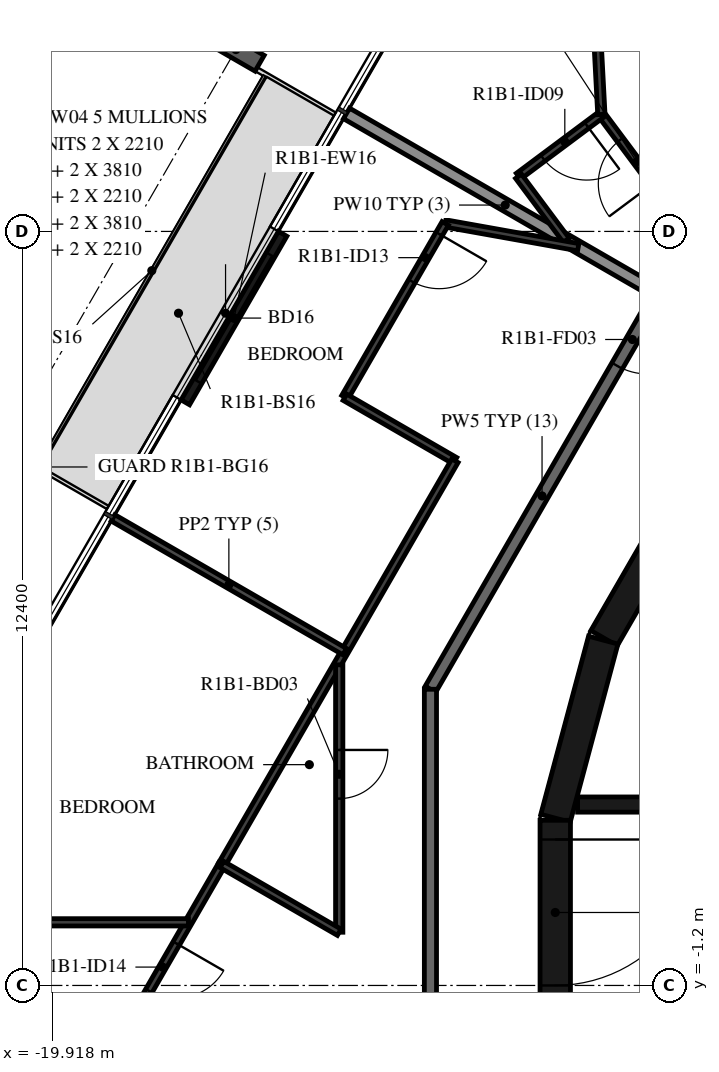
"""IFC4 building model, lengths in metres.
Left out: names, types, materials, properties, quantities, classifications, styles, units other than length and angle.
Written with IfcOpenShell. Run it as: python <this file> out.ifc"""

import sys

from ifc_helpers import new_model, si_unit, direction, frame, frame_2d, origin, origin_2d, place, context, subcontext, project, spatial, rectangle, i_section, extrude, element, fill, save


model = new_model("IFC4")
c1 = context("Model", 3, precision=1e-05, world=origin(), true_north=direction((0.0, 1.0)))
c2 = subcontext(c1, "Body", "Model", "MODEL_VIEW")
j1 = project(units=[si_unit("LENGTHUNIT", "METRE"), si_unit("PLANEANGLEUNIT", "RADIAN")], contexts=[c1])
p1 = place(None, origin())
s1 = spatial("IfcSite", under=j1, at=p1, CompositionType="ELEMENT")
p2 = place(p1, origin())
s2 = spatial("IfcBuilding", under=s1, at=p2, CompositionType="ELEMENT")
p3 = place(p2, frame((0.0, 0.0, 48.9)))
s3 = spatial("IfcBuildingStorey", under=s2, at=p3, CompositionType="ELEMENT", Elevation=48.9)
p4 = place(p3, frame((-16.899, 14.19, -0.38), z_axis=(0.0, 0.0, 1.0), x_axis=(0.50000017485, 0.866025302835, 0.0)))
e1 = element("IfcColumn", 1, at=p4, inside=s3, PredefinedType="COLUMN", context=c2, shape_type="SweptSolid", body=[
    extrude(i_section(OverallWidth=0.3, OverallDepth=0.9, WebThickness=0.019, FlangeThickness=0.035, FilletRadius=0.03, at=origin_2d()), origin(), (0.0, 0.0, 1.0), 3.5),
])
p5 = place(p3, frame((-16.131, 11.161, 0.0), z_axis=(0.0, 0.0, 1.0), x_axis=(-0.500028443584, -0.866008981251, 0.0)))
e2 = element("IfcWall", 2, at=p5, inside=s3, PredefinedType="STANDARD", context=c2, shape_type="SweptSolid", body=[
    extrude(rectangle(XDim=3.2, YDim=0.16, at=frame_2d((1.6, 0.0))), origin(), (0.0, 0.0, 1.0), 3.12),
])
p6 = place(p5, frame((0.4, 0.0, 0.0)))
e3 = element("IfcOpeningElement", 3, at=p6, cuts=e2, PredefinedType="OPENING", context=c2, shape_type="SweptSolid", body=[
    extrude(rectangle(XDim=2.4, YDim=2.4, at=frame_2d((1.2, 1.2))), frame((0.0, 0.09, 0.0), z_axis=(0.0, -1.0, 0.0), x_axis=(1.0, 0.0, 0.0)), (0.0, 0.0, 1.0), 0.18),
])
for number, where, z_axis, x_axis in (
    (4, (-9.329, 7.137, 0.0), (0.0, 0.0, 1.0), (-0.5, -0.866, 0.0)),
    (5, (-10.858, 4.479, 0.0), (0.0, 0.0, 1.0), (-0.259, -0.966, 0.0)),
):
    element("IfcWall", number, at=place(p3, frame(where, z_axis=z_axis, x_axis=x_axis)), inside=s3, PredefinedType="SHEAR", context=c2, shape_type="SweptSolid", body=[
        extrude(rectangle(XDim=3.033, YDim=0.5, at=frame_2d((1.516, 0.0))), origin(), (0.0, 0.0, 1.0), 3.12),
    ])
p7 = place(p3, frame((-11.647, 1.516, 0.0), z_axis=(0.0, 0.0, 1.0), x_axis=(0.0, -1.0, 0.0)))
e6 = element("IfcWall", 6, at=p7, inside=s3, PredefinedType="SHEAR", context=c2, shape_type="SweptSolid", body=[
    extrude(rectangle(XDim=3.033, YDim=0.5, at=frame_2d((1.516, 0.0))), origin(), (0.0, 0.0, 1.0), 3.12),
])
p8 = place(p7, frame((0.316, 0.0, 0.0)))
e7 = element("IfcOpeningElement", 7, at=p8, cuts=e6, PredefinedType="OPENING", context=c2, shape_type="SweptSolid", body=[
    extrude(rectangle(XDim=2.4, YDim=2.1, at=frame_2d((1.2, 1.05))), frame((0.0, 0.26, 0.0), z_axis=(0.0, -1.0, 0.0), x_axis=(1.0, 0.0, 0.0)), (0.0, 0.0, 1.0), 0.52),
])
p9 = place(p3, frame((-11.28, 1.775, 0.0), z_axis=(0.0, 0.0, 1.0), x_axis=(1.0, 0.0, 0.0)))
e8 = element("IfcWall", 8, at=p9, inside=s3, PredefinedType="SHEAR", context=c2, shape_type="SweptSolid", body=[
    extrude(rectangle(XDim=14.38, YDim=0.25, at=frame_2d((7.19, 0.0))), origin(), (0.0, 0.0, 1.0), 3.12),
])
p10 = place(p9, frame((2.13, 0.0, 0.0)))
e9 = element("IfcOpeningElement", 9, at=p10, cuts=e8, PredefinedType="OPENING", context=c2, shape_type="SweptSolid", body=[
    extrude(rectangle(XDim=1.1, YDim=2.1, at=frame_2d((0.55, 1.05))), frame((0.0, 0.135, 0.0), z_axis=(0.0, -1.0, 0.0), x_axis=(1.0, 0.0, 0.0)), (0.0, 0.0, 1.0), 0.27),
])
p11 = place(p9, frame((4.28, 0.0, 0.0)))
e10 = element("IfcOpeningElement", 10, at=p11, cuts=e8, PredefinedType="OPENING", context=c2, shape_type="SweptSolid", body=[
    extrude(rectangle(XDim=1.1, YDim=2.1, at=frame_2d((0.55, 1.05))), frame((0.0, 0.135, 0.0), z_axis=(0.0, -1.0, 0.0), x_axis=(1.0, 0.0, 0.0)), (0.0, 0.0, 1.0), 0.27),
])
p12 = place(p9, frame((6.43, 0.0, 0.0)))
e11 = element("IfcOpeningElement", 11, at=p12, cuts=e8, PredefinedType="OPENING", context=c2, shape_type="SweptSolid", body=[
    extrude(rectangle(XDim=1.1, YDim=2.1, at=frame_2d((0.55, 1.05))), frame((0.0, 0.135, 0.0), z_axis=(0.0, -1.0, 0.0), x_axis=(1.0, 0.0, 0.0)), (0.0, 0.0, 1.0), 0.27),
])
p13 = place(p9, frame((8.58, 0.0, 0.0)))
e12 = element("IfcOpeningElement", 12, at=p13, cuts=e8, PredefinedType="OPENING", context=c2, shape_type="SweptSolid", body=[
    extrude(rectangle(XDim=1.1, YDim=2.1, at=frame_2d((0.55, 1.05))), frame((0.0, 0.135, 0.0), z_axis=(0.0, -1.0, 0.0), x_axis=(1.0, 0.0, 0.0)), (0.0, 0.0, 1.0), 0.27),
])
p14 = place(p9, frame((10.83, 0.0, 0.0)))
e13 = element("IfcOpeningElement", 13, at=p14, cuts=e8, PredefinedType="OPENING", context=c2, shape_type="SweptSolid", body=[
    extrude(rectangle(XDim=0.9, YDim=2.1, at=frame_2d((0.45, 1.05))), frame((0.0, 0.135, 0.0), z_axis=(0.0, -1.0, 0.0), x_axis=(1.0, 0.0, 0.0)), (0.0, 0.0, 1.0), 0.27),
])
p15 = place(p9, frame((12.98, 0.0, 0.0)))
e14 = element("IfcOpeningElement", 14, at=p15, cuts=e8, PredefinedType="OPENING", context=c2, shape_type="SweptSolid", body=[
    extrude(rectangle(XDim=0.9, YDim=2.1, at=frame_2d((0.45, 1.05))), frame((0.0, 0.135, 0.0), z_axis=(0.0, -1.0, 0.0), x_axis=(1.0, 0.0, 0.0)), (0.0, 0.0, 1.0), 0.27),
])
p16 = place(p3, frame((-10.029, 10.029, 0.0), z_axis=(0.0, 0.0, 1.0), x_axis=(-0.500001669485, -0.866024439905, 0.0)))
e15 = element("IfcWall", 15, at=p16, inside=s3, PredefinedType="STANDARD", context=c2, shape_type="SweptSolid", body=[
    extrude(rectangle(XDim=7.342, YDim=0.2, at=frame_2d((3.671, 0.0))), origin(), (0.0, 0.0, 1.0), 3.12),
])
p17 = place(p16, frame((0.2, 0.0, 0.0)))
e16 = element("IfcOpeningElement", 16, at=p17, cuts=e15, PredefinedType="OPENING", context=c2, shape_type="SweptSolid", body=[
    extrude(rectangle(XDim=1.0, YDim=2.1, at=frame_2d((0.5, 1.05))), frame((0.0, 0.11, 0.0), z_axis=(0.0, -1.0, 0.0), x_axis=(1.0, 0.0, 0.0)), (0.0, 0.0, 1.0), 0.22),
])
p18 = place(p3, frame((-13.7, 3.671, 0.0), z_axis=(0.0, 0.0, 1.0), x_axis=(0.0, -1.0, 0.0)))
e17 = element("IfcWall", 17, at=p18, inside=s3, PredefinedType="STANDARD", context=c2, shape_type="SweptSolid", body=[
    extrude(rectangle(XDim=7.342, YDim=0.2, at=frame_2d((3.671, 0.0))), origin(), (0.0, 0.0, 1.0), 3.12),
])
p19 = place(p3, frame((-15.08, 13.14, 0.0), z_axis=(0.0, 0.0, 1.0), x_axis=(0.86603112331, -0.49999009336, 0.0)))
e18 = element("IfcWall", 18, at=p19, inside=s3, PredefinedType="STANDARD", context=c2, shape_type="SweptSolid", body=[
    extrude(rectangle(XDim=6.027, YDim=0.2, at=frame_2d((3.014, 0.0))), origin(), (0.0, 0.0, 1.0), 2.73),
])
p20 = place(p3, frame((-9.92, 11.824, 0.0), z_axis=(0.0, 0.0, 1.0), x_axis=(-0.597853402964, 0.801605456921, 0.0)))
e19 = element("IfcWall", 19, at=p20, inside=s3, PredefinedType="PARTITIONING", context=c2, shape_type="SweptSolid", body=[
    extrude(rectangle(XDim=1.621, YDim=0.12, at=frame_2d((0.811, 0.0))), origin(), (0.0, 0.0, 1.0), 3.12),
])
p21 = place(p20, frame((0.2, 0.0, 0.0)))
e20 = element("IfcOpeningElement", 20, at=p21, cuts=e19, PredefinedType="OPENING", context=c2, shape_type="SweptSolid", body=[
    extrude(rectangle(XDim=0.9, YDim=2.1, at=frame_2d((0.45, 1.05))), frame((0.0, 0.07, 0.0), z_axis=(0.0, -1.0, 0.0), x_axis=(1.0, 0.0, 0.0)), (0.0, 0.0, 1.0), 0.14),
])
p22 = place(p3, frame((-10.889, 13.124, 0.0), z_axis=(0.0, 0.0, 1.0), x_axis=(-0.801616976804, -0.597837956724, 0.0)))
e21 = element("IfcWall", 21, at=p22, inside=s3, PredefinedType="PARTITIONING", context=c2, shape_type="SweptSolid", body=[
    extrude(rectangle(XDim=1.7, YDim=0.12, at=frame_2d((0.85, 0.0))), origin(), (0.0, 0.0, 1.0), 3.12),
])
p23 = place(p22, frame((0.3, 0.0, 0.0)))
e22 = element("IfcOpeningElement", 22, at=p23, cuts=e21, PredefinedType="OPENING", context=c2, shape_type="SweptSolid", body=[
    extrude(rectangle(XDim=0.9, YDim=2.1, at=frame_2d((0.45, 1.05))), frame((0.0, 0.07, 0.0), z_axis=(0.0, -1.0, 0.0), x_axis=(1.0, 0.0, 0.0)), (0.0, 0.0, 1.0), 0.14),
])
p24 = place(p3, frame((-12.252, 12.107, 0.0), z_axis=(0.0, 0.0, 1.0), x_axis=(0.597827926538, -0.801624457119, 0.0)))
e23 = element("IfcWall", 23, at=p24, inside=s3, PredefinedType="PARTITIONING", context=c2, shape_type="SweptSolid", body=[
    extrude(rectangle(XDim=1.314, YDim=0.12, at=frame_2d((0.657, 0.0))), origin(), (0.0, 0.0, 1.0), 3.12),
])
p25 = place(p3, frame((-11.24, 19.792, 0.0), z_axis=(0.0, 0.0, 1.0), x_axis=(0.052579943632, -0.998616718029, 0.0)))
e24 = element("IfcWall", 24, at=p25, inside=s3, PredefinedType="PARTITIONING", context=c2, shape_type="SweptSolid", body=[
    extrude(rectangle(XDim=6.677, YDim=0.12, at=frame_2d((3.338, 0.0))), origin(), (0.0, 0.0, 1.0), 3.12),
])
p26 = place(p3, frame((-11.27, 10.94, 0.0), z_axis=(0.0, 0.0, 1.0), x_axis=(-0.984382718707, 0.176041651637, 0.0)))
e25 = element("IfcWall", 25, at=p26, inside=s3, PredefinedType="PARTITIONING", context=c2, shape_type="SweptSolid", body=[
    extrude(rectangle(XDim=2.222, YDim=0.12, at=frame_2d((1.111, 0.0))), origin(), (0.0, 0.0, 1.0), 3.12),
])
p27 = place(p3, frame((-13.457, 11.332, 0.0), z_axis=(0.0, 0.0, 1.0), x_axis=(-0.499974350878, -0.866040211805, 0.0)))
e26 = element("IfcWall", 26, at=p27, inside=s3, PredefinedType="PARTITIONING", context=c2, shape_type="SweptSolid", body=[
    extrude(rectangle(XDim=3.3, YDim=0.12, at=frame_2d((1.65, 0.0))), origin(), (0.0, 0.0, 1.0), 3.12),
])
p28 = place(p27, frame((0.2, 0.0, 0.0)))
e27 = element("IfcOpeningElement", 27, at=p28, cuts=e26, PredefinedType="OPENING", context=c2, shape_type="SweptSolid", body=[
    extrude(rectangle(XDim=0.9, YDim=2.1, at=frame_2d((0.45, 1.05))), frame((0.0, 0.07, 0.0), z_axis=(0.0, -1.0, 0.0), x_axis=(1.0, 0.0, 0.0)), (0.0, 0.0, 1.0), 0.14),
])
p29 = place(p3, frame((-15.106, 8.474, 0.0), z_axis=(0.0, 0.0, 1.0), x_axis=(0.866041603473, -0.499971940267, 0.0)))
e28 = element("IfcWall", 28, at=p29, inside=s3, PredefinedType="PARTITIONING", context=c2, shape_type="SweptSolid", body=[
    extrude(rectangle(XDim=2.089, YDim=0.12, at=frame_2d((1.045, 0.0))), origin(), (0.0, 0.0, 1.0), 3.12),
])
p30 = place(p3, frame((-13.297, 7.429, 0.0), z_axis=(0.0, 0.0, 1.0), x_axis=(-0.49999903102, -0.866025963225, 0.0)))
e29 = element("IfcWall", 29, at=p30, inside=s3, PredefinedType="PARTITIONING", context=c2, shape_type="SweptSolid", body=[
    extrude(rectangle(XDim=7.667, YDim=0.12, at=frame_2d((3.833, 0.0))), origin(), (0.0, 0.0, 1.0), 3.12),
])
p31 = place(p3, frame((-17.13, 0.79, 0.0), z_axis=(0.0, 0.0, 1.0), x_axis=(-0.499997052475, -0.866027105532, 0.0)))
e30 = element("IfcWall", 30, at=p31, inside=s3, PredefinedType="PARTITIONING", context=c2, shape_type="SweptSolid", body=[
    extrude(rectangle(XDim=12.006, YDim=0.12, at=frame_2d((6.003, 0.0))), origin(), (0.0, 0.0, 1.0), 3.12),
])
p32 = place(p31, frame((1.498, 0.0, 0.0)))
e31 = element("IfcOpeningElement", 31, at=p32, cuts=e30, PredefinedType="OPENING", context=c2, shape_type="SweptSolid", body=[
    extrude(rectangle(XDim=0.9, YDim=2.1, at=frame_2d((0.45, 1.05))), frame((0.0, 0.07, 0.0), z_axis=(0.0, -1.0, 0.0), x_axis=(1.0, 0.0, 0.0)), (0.0, 0.0, 1.0), 0.14),
])
p33 = place(p3, frame((-15.2, 4.073, 0.0), z_axis=(0.0, 0.0, 1.0), x_axis=(0.0, -1.0, 0.0)))
e32 = element("IfcWall", 32, at=p33, inside=s3, PredefinedType="PARTITIONING", context=c2, shape_type="SweptSolid", body=[
    extrude(rectangle(XDim=4.398, YDim=0.12, at=frame_2d((2.199, 0.0))), origin(), (0.0, 0.0, 1.0), 3.12),
])
p34 = place(p33, frame((1.4, 0.0, 0.0)))
e33 = element("IfcOpeningElement", 33, at=p34, cuts=e32, PredefinedType="OPENING", context=c2, shape_type="SweptSolid", body=[
    extrude(rectangle(XDim=0.8, YDim=2.1, at=frame_2d((0.4, 1.05))), frame((0.0, 0.07, 0.0), z_axis=(0.0, -1.0, 0.0), x_axis=(1.0, 0.0, 0.0)), (0.0, 0.0, 1.0), 0.14),
])
p35 = place(p3, frame((-15.2, -0.325, 0.0), z_axis=(0.0, 0.0, 1.0), x_axis=(-0.866003168561, 0.500038510559, 0.0)))
e34 = element("IfcWall", 34, at=p35, inside=s3, PredefinedType="PARTITIONING", context=c2, shape_type="SweptSolid", body=[
    extrude(rectangle(XDim=2.229, YDim=0.12, at=frame_2d((1.114, 0.0))), origin(), (0.0, 0.0, 1.0), 3.12),
])
p36 = place(p3, frame((-18.92, 6.49, 0.0), z_axis=(0.0, 0.0, 1.0), x_axis=(0.865994303029, -0.500053864221, 0.0)))
e35 = element("IfcWall", 35, at=p36, inside=s3, PredefinedType="PARTITIONING", context=c2, shape_type="SweptSolid", body=[
    extrude(rectangle(XDim=4.4, YDim=0.12, at=frame_2d((2.2, 0.0))), origin(), (0.0, 0.0, 1.0), 2.73),
])
p37 = place(p3, frame((-22.76, -0.162, 0.0), z_axis=(0.0, 0.0, 1.0), x_axis=(1.0, 0.0, 0.0)))
e36 = element("IfcWall", 36, at=p37, inside=s3, PredefinedType="PARTITIONING", context=c2, shape_type="SweptSolid", body=[
    extrude(rectangle(XDim=5.081, YDim=0.12, at=frame_2d((2.54, 0.0))), origin(), (0.0, 0.0, 1.0), 3.12),
])
p38 = place(p37, frame((0.4, 0.0, 0.0)))
e37 = element("IfcOpeningElement", 37, at=p38, cuts=e36, PredefinedType="OPENING", context=c2, shape_type="SweptSolid", body=[
    extrude(rectangle(XDim=0.9, YDim=2.1, at=frame_2d((0.45, 1.05))), frame((0.0, 0.07, 0.0), z_axis=(0.0, -1.0, 0.0), x_axis=(1.0, 0.0, 0.0)), (0.0, 0.0, 1.0), 0.14),
])
p39 = place(p6, origin())
e38 = element("IfcDoor", 38, at=p39, inside=s3, OperationType="DOUBLE_DOOR_SLIDING", PredefinedType="DOOR", context=c2, shape_type="SweptSolid", body=[
    extrude(rectangle(XDim=2.4, YDim=2.4, at=frame_2d((1.2, 1.2))), frame((0.0, 0.025, 0.0), z_axis=(0.0, -1.0, 0.0), x_axis=(1.0, 0.0, 0.0)), (0.0, 0.0, 1.0), 0.05),
])
fill(e3, e38)
p40 = place(p8, origin())
e39 = element("IfcDoor", 39, at=p40, inside=s3, OperationType="DOUBLE_DOOR_SINGLE_SWING", PredefinedType="DOOR", context=c2, shape_type="SweptSolid", body=[
    extrude(rectangle(XDim=2.4, YDim=2.1, at=frame_2d((1.2, 1.05))), frame((0.0, 0.025, 0.0), z_axis=(0.0, -1.0, 0.0), x_axis=(1.0, 0.0, 0.0)), (0.0, 0.0, 1.0), 0.05),
])
fill(e7, e39)
p41 = place(p21, origin())
e40 = element("IfcDoor", 40, at=p41, inside=s3, OperationType="SINGLE_SWING_RIGHT", PredefinedType="DOOR", context=c2, shape_type="SweptSolid", body=[
    extrude(rectangle(XDim=0.9, YDim=2.1, at=frame_2d((0.45, 1.05))), frame((0.0, 0.025, 0.0), z_axis=(0.0, -1.0, 0.0), x_axis=(1.0, 0.0, 0.0)), (0.0, 0.0, 1.0), 0.05),
])
fill(e20, e40)
p42 = place(p23, origin())
e41 = element("IfcDoor", 41, at=p42, inside=s3, OperationType="SINGLE_SWING_LEFT", PredefinedType="DOOR", context=c2, shape_type="SweptSolid", body=[
    extrude(rectangle(XDim=0.9, YDim=2.1, at=frame_2d((0.45, 1.05))), frame((0.0, 0.025, 0.0), z_axis=(0.0, -1.0, 0.0), x_axis=(1.0, 0.0, 0.0)), (0.0, 0.0, 1.0), 0.05),
])
fill(e22, e41)
p43 = place(p17, origin())
e42 = element("IfcDoor", 42, at=p43, inside=s3, OperationType="SINGLE_SWING_LEFT", PredefinedType="DOOR", context=c2, shape_type="SweptSolid", body=[
    extrude(rectangle(XDim=1.0, YDim=2.1, at=frame_2d((0.5, 1.05))), frame((0.0, 0.025, 0.0), z_axis=(0.0, -1.0, 0.0), x_axis=(1.0, 0.0, 0.0)), (0.0, 0.0, 1.0), 0.05),
])
fill(e16, e42)
p44 = place(p28, origin())
e43 = element("IfcDoor", 43, at=p44, inside=s3, OperationType="SINGLE_SWING_LEFT", PredefinedType="DOOR", context=c2, shape_type="SweptSolid", body=[
    extrude(rectangle(XDim=0.9, YDim=2.1, at=frame_2d((0.45, 1.05))), frame((0.0, 0.025, 0.0), z_axis=(0.0, -1.0, 0.0), x_axis=(1.0, 0.0, 0.0)), (0.0, 0.0, 1.0), 0.05),
])
fill(e27, e43)
p45 = place(p34, origin())
e44 = element("IfcDoor", 44, at=p45, inside=s3, OperationType="SINGLE_SWING_RIGHT", PredefinedType="DOOR", context=c2, shape_type="SweptSolid", body=[
    extrude(rectangle(XDim=0.8, YDim=2.1, at=frame_2d((0.4, 1.05))), frame((0.0, 0.025, 0.0), z_axis=(0.0, -1.0, 0.0), x_axis=(1.0, 0.0, 0.0)), (0.0, 0.0, 1.0), 0.05),
])
fill(e33, e44)
p46 = place(p32, origin())
e45 = element("IfcDoor", 45, at=p46, inside=s3, OperationType="SINGLE_SWING_RIGHT", PredefinedType="DOOR", context=c2, shape_type="SweptSolid", body=[
    extrude(rectangle(XDim=0.9, YDim=2.1, at=frame_2d((0.45, 1.05))), frame((0.0, 0.025, 0.0), z_axis=(0.0, -1.0, 0.0), x_axis=(1.0, 0.0, 0.0)), (0.0, 0.0, 1.0), 0.05),
])
fill(e31, e45)
save(model, sys.argv[1])
